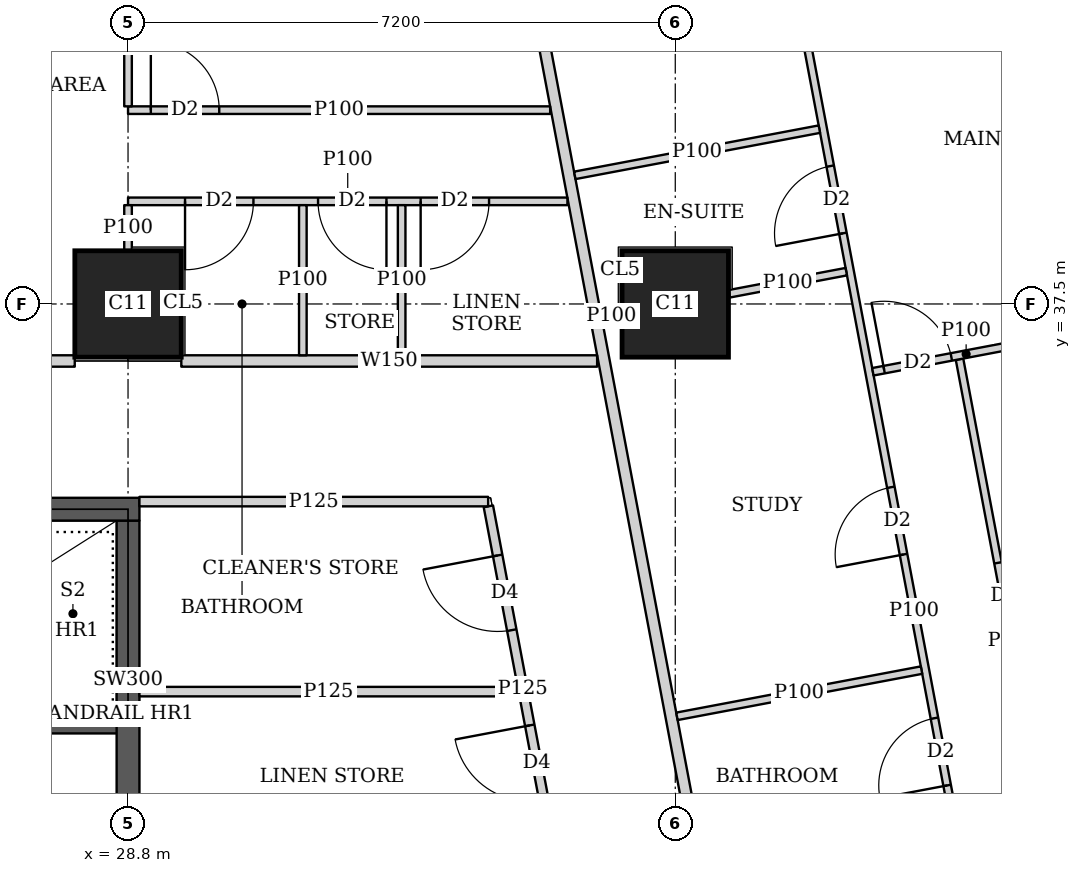
"""IFC4 building model, lengths in metres.
Left out: names, types, materials, properties, quantities, classifications, styles, units other than length and angle.
Written with IfcOpenShell. Run it as: python <this file> out.ifc"""

import sys

from ifc_helpers import new_model, si_unit, direction, frame, frame_2d, origin, origin_2d, place, context, subcontext, project, spatial, rectangle, extrude, element, fill, save


model = new_model("IFC4")
c1 = context("Model", 3, precision=1e-05, world=origin(), true_north=direction((0.0, 1.0)))
c2 = subcontext(c1, "Body", "Model", "MODEL_VIEW")
j1 = project(units=[si_unit("LENGTHUNIT", "METRE"), si_unit("PLANEANGLEUNIT", "RADIAN")], contexts=[c1])
p1 = place(None, origin())
s1 = spatial("IfcSite", under=j1, at=p1, CompositionType="ELEMENT")
p2 = place(p1, origin())
s2 = spatial("IfcBuilding", under=s1, at=p2, CompositionType="ELEMENT")
p3 = place(p2, frame((0.0, 0.0, 285.35)))
s3 = spatial("IfcBuildingStorey", under=s2, at=p3, CompositionType="ELEMENT", Elevation=285.35)
for number, where, z_axis, x_axis in (
    (1, (28.8, 37.5, 0.0), (0.0, 0.0, 1.0), (1.0, 0.0, 0.0)),
    (2, (36.0, 37.5, 0.0), (0.0, 0.0, 1.0), (1.0, 0.0, 0.0)),
):
    element("IfcColumn", number, at=place(p3, frame(where, z_axis=z_axis, x_axis=x_axis)), inside=s3, PredefinedType="COLUMN", context=c2, shape_type="SweptSolid", body=[
        extrude(rectangle(XDim=1.4, YDim=1.4, at=origin_2d()), origin(), (0.0, 0.0, 1.0), 3.75),
    ])
p4 = place(p3, frame((21.45, 34.8, 0.0), z_axis=(0.0, 0.0, 1.0), x_axis=(1.0, 0.0, 0.0)))
e3 = element("IfcWall", 3, at=p4, inside=s3, PredefinedType="SHEAR", context=c2, shape_type="SweptSolid", body=[
    extrude(rectangle(XDim=7.5, YDim=0.3, at=frame_2d((3.75, 0.0))), origin(), (0.0, 0.0, 1.0), 3.75),
])
p5 = place(p4, frame((0.5, 0.0, 0.0)))
e4 = element("IfcOpeningElement", 4, at=p5, cuts=e3, PredefinedType="OPENING", context=c2, shape_type="SweptSolid", body=[
    extrude(rectangle(XDim=1.1, YDim=2.1, at=frame_2d((0.55, 1.05))), frame((0.0, 0.16, 0.0), z_axis=(0.0, -1.0, 0.0), x_axis=(1.0, 0.0, 0.0)), (0.0, 0.0, 1.0), 0.32),
])
p6 = place(p3, frame((28.8, 30.45, 0.0), z_axis=(0.0, 0.0, 1.0), x_axis=(0.0, 1.0, 0.0)))
e5 = element("IfcWall", 5, at=p6, inside=s3, PredefinedType="SHEAR", context=c2, shape_type="SweptSolid", body=[
    extrude(rectangle(XDim=4.2, YDim=0.3, at=frame_2d((2.1, 0.0))), origin(), (0.0, 0.0, 1.0), 3.75),
])
p7 = place(p3, frame((22.301, 36.75, 0.0), z_axis=(0.0, 0.0, 1.0), x_axis=(1.0, 0.0, 0.0)))
e6 = element("IfcWall", 6, at=p7, inside=s3, PredefinedType="SOLIDWALL", context=c2, shape_type="SweptSolid", body=[
    extrude(rectangle(XDim=5.798, YDim=0.15, at=frame_2d((2.899, 0.0))), origin(), (0.0, 0.0, 1.0), 3.5),
])
p8 = place(p7, frame((4.199, 0.0, 0.0)))
e7 = element("IfcOpeningElement", 7, at=p8, cuts=e6, PredefinedType="OPENING", context=c2, shape_type="SweptSolid", body=[
    extrude(rectangle(XDim=1.0, YDim=2.1, at=frame_2d((0.5, 1.05))), frame((0.0, 0.085, 0.0), z_axis=(0.0, -1.0, 0.0), x_axis=(1.0, 0.0, 0.0)), (0.0, 0.0, 1.0), 0.17),
])
p9 = place(p3, frame((29.501, 36.75, 0.0), z_axis=(0.0, 0.0, 1.0), x_axis=(1.0, 0.0, 0.0)))
e8 = element("IfcWall", 8, at=p9, inside=s3, PredefinedType="SOLIDWALL", context=c2, shape_type="SweptSolid", body=[
    extrude(rectangle(XDim=5.471, YDim=0.15, at=frame_2d((2.735, 0.0))), origin(), (0.0, 0.0, 1.0), 3.5),
])
p10 = place(p3, frame((34.036, 42.186, 0.0), z_axis=(0.0, 0.0, 1.0), x_axis=(0.185593518645, -0.9826266055, 0.0)))
e9 = element("IfcWall", 9, at=p10, inside=s3, PredefinedType="SOLIDWALL", context=c2, shape_type="SweptSolid", body=[
    extrude(rectangle(XDim=35.961, YDim=0.15, at=frame_2d((17.98, 0.0))), origin(), (0.0, 0.0, 1.0), 2.5),
])
p11 = place(p10, frame((19.345, 0.0, 0.0)))
e10 = element("IfcOpeningElement", 10, at=p11, cuts=e9, PredefinedType="OPENING", context=c2, shape_type="SweptSolid", body=[
    extrude(rectangle(XDim=1.0, YDim=2.1, at=frame_2d((0.5, 1.05))), frame((0.0, 0.085, 0.0), z_axis=(0.0, -1.0, 0.0), x_axis=(1.0, 0.0, 0.0)), (0.0, 0.0, 1.0), 0.17),
])
p12 = place(p10, frame((33.774, 0.0, 0.0)))
e11 = element("IfcOpeningElement", 11, at=p12, cuts=e9, PredefinedType="OPENING", context=c2, shape_type="SweptSolid", body=[
    extrude(rectangle(XDim=1.0, YDim=2.1, at=frame_2d((0.5, 1.05))), frame((0.0, 0.085, 0.0), z_axis=(0.0, -1.0, 0.0), x_axis=(1.0, 0.0, 0.0)), (0.0, 0.0, 1.0), 0.17),
])
p13 = place(p3, frame((41.054, 37.072, 0.0), z_axis=(0.0, 0.0, 1.0), x_axis=(-0.982579896219, -0.185840650951, 0.0)))
e12 = element("IfcWall", 12, at=p13, inside=s3, PredefinedType="PARTITIONING", context=c2, shape_type="SweptSolid", body=[
    extrude(rectangle(XDim=2.497, YDim=0.1, at=frame_2d((1.249, 0.0))), origin(), (0.0, 0.0, 1.0), 3.5),
])
p14 = place(p13, frame((1.447, 0.0, 0.0)))
e13 = element("IfcOpeningElement", 13, at=p14, cuts=e12, PredefinedType="OPENING", context=c2, shape_type="SweptSolid", body=[
    extrude(rectangle(XDim=0.9, YDim=2.1, at=frame_2d((0.45, 1.05))), frame((0.0, 0.06, 0.0), z_axis=(0.0, -1.0, 0.0), x_axis=(1.0, 0.0, 0.0)), (0.0, 0.0, 1.0), 0.12),
])
p15 = place(p3, frame((37.896, 39.8, 0.0), z_axis=(0.0, 0.0, 1.0), x_axis=(-0.982607026909, -0.185697147715, 0.0)))
e14 = element("IfcWall", 14, at=p15, inside=s3, PredefinedType="PARTITIONING", context=c2, shape_type="SweptSolid", body=[
    extrude(rectangle(XDim=3.275, YDim=0.1, at=frame_2d((1.637, 0.0))), origin(), (0.0, 0.0, 1.0), 3.5),
])
p16 = place(p3, frame((38.25, 37.925, 0.0), z_axis=(0.0, 0.0, 1.0), x_axis=(-0.982610209589, -0.185680305934, 0.0)))
e15 = element("IfcWall", 15, at=p16, inside=s3, PredefinedType="PARTITIONING", context=c2, shape_type="SweptSolid", body=[
    extrude(rectangle(XDim=1.567, YDim=0.1, at=frame_2d((0.784, 0.0))), origin(), (0.0, 0.0, 1.0), 3.5),
])
p17 = place(p3, frame((35.29, 37.366, 0.0), z_axis=(0.0, 0.0, 1.0), x_axis=(-0.982395465615, -0.18681313963, 0.0)))
e16 = element("IfcWall", 16, at=p17, inside=s3, PredefinedType="PARTITIONING", context=c2, shape_type="SweptSolid", body=[
    extrude(rectangle(XDim=0.263, YDim=0.1, at=frame_2d((0.131, 0.0))), origin(), (0.0, 0.0, 1.0), 3.5),
])
p18 = place(p3, frame((39.24, 32.683, 0.0), z_axis=(0.0, 0.0, 1.0), x_axis=(-0.982607026909, -0.185697147715, 0.0)))
e17 = element("IfcWall", 17, at=p18, inside=s3, PredefinedType="PARTITIONING", context=c2, shape_type="SweptSolid", body=[
    extrude(rectangle(XDim=3.275, YDim=0.1, at=frame_2d((1.637, 0.0))), origin(), (0.0, 0.0, 1.0), 3.5),
])
p19 = place(p3, frame((37.591, 41.685, 0.0), z_axis=(0.0, 0.0, 1.0), x_axis=(0.185541820726, -0.982636368532, 0.0)))
e18 = element("IfcWall", 18, at=p19, inside=s3, PredefinedType="PARTITIONING", context=c2, shape_type="SweptSolid", body=[
    extrude(rectangle(XDim=16.735, YDim=0.1, at=frame_2d((8.367, 0.0))), origin(), (0.0, 0.0, 1.0), 2.5),
])
p20 = place(p19, frame((2.413, 0.0, 0.0)))
e19 = element("IfcOpeningElement", 19, at=p20, cuts=e18, PredefinedType="OPENING", context=c2, shape_type="SweptSolid", body=[
    extrude(rectangle(XDim=0.9, YDim=2.1, at=frame_2d((0.45, 1.05))), frame((0.0, 0.06, 0.0), z_axis=(0.0, -1.0, 0.0), x_axis=(1.0, 0.0, 0.0)), (0.0, 0.0, 1.0), 0.12),
])
p21 = place(p19, frame((6.713, 0.0, 0.0)))
e20 = element("IfcOpeningElement", 20, at=p21, cuts=e18, PredefinedType="OPENING", context=c2, shape_type="SweptSolid", body=[
    extrude(rectangle(XDim=0.9, YDim=2.1, at=frame_2d((0.45, 1.05))), frame((0.0, 0.06, 0.0), z_axis=(0.0, -1.0, 0.0), x_axis=(1.0, 0.0, 0.0)), (0.0, 0.0, 1.0), 0.12),
])
p22 = place(p19, frame((9.805, 0.0, 0.0)))
e21 = element("IfcOpeningElement", 21, at=p22, cuts=e18, PredefinedType="OPENING", context=c2, shape_type="SweptSolid", body=[
    extrude(rectangle(XDim=0.9, YDim=2.1, at=frame_2d((0.45, 1.05))), frame((0.0, 0.06, 0.0), z_axis=(0.0, -1.0, 0.0), x_axis=(1.0, 0.0, 0.0)), (0.0, 0.0, 1.0), 0.12),
])
p23 = place(p19, frame((11.713, 0.0, 0.0)))
e22 = element("IfcOpeningElement", 22, at=p23, cuts=e18, PredefinedType="OPENING", context=c2, shape_type="SweptSolid", body=[
    extrude(rectangle(XDim=0.9, YDim=2.1, at=frame_2d((0.45, 1.05))), frame((0.0, 0.06, 0.0), z_axis=(0.0, -1.0, 0.0), x_axis=(1.0, 0.0, 0.0)), (0.0, 0.0, 1.0), 0.12),
])
p24 = place(p19, frame((14.426, 0.0, 0.0)))
e23 = element("IfcOpeningElement", 23, at=p24, cuts=e18, PredefinedType="OPENING", context=c2, shape_type="SweptSolid", body=[
    extrude(rectangle(XDim=0.9, YDim=2.1, at=frame_2d((0.45, 1.05))), frame((0.0, 0.06, 0.0), z_axis=(0.0, -1.0, 0.0), x_axis=(1.0, 0.0, 0.0)), (0.0, 0.0, 1.0), 0.12),
])
p25 = place(p3, frame((39.74, 36.773, 0.0), z_axis=(0.0, 0.0, 1.0), x_axis=(0.185583825641, -0.982628436216, 0.0)))
e24 = element("IfcWall", 24, at=p25, inside=s3, PredefinedType="PARTITIONING", context=c2, shape_type="SweptSolid", body=[
    extrude(rectangle(XDim=7.533, YDim=0.1, at=frame_2d((3.766, 0.0))), origin(), (0.0, 0.0, 1.0), 2.5),
])
p26 = place(p25, frame((2.726, 0.0, 0.0)))
e25 = element("IfcOpeningElement", 25, at=p26, cuts=e24, PredefinedType="OPENING", context=c2, shape_type="SweptSolid", body=[
    extrude(rectangle(XDim=0.9, YDim=2.1, at=frame_2d((0.45, 1.05))), frame((0.0, 0.06, 0.0), z_axis=(0.0, -1.0, 0.0), x_axis=(1.0, 0.0, 0.0)), (0.0, 0.0, 1.0), 0.12),
])
p27 = place(p25, frame((6.383, 0.0, 0.0)))
e26 = element("IfcOpeningElement", 26, at=p27, cuts=e24, PredefinedType="OPENING", context=c2, shape_type="SweptSolid", body=[
    extrude(rectangle(XDim=0.9, YDim=2.1, at=frame_2d((0.45, 1.05))), frame((0.0, 0.06, 0.0), z_axis=(0.0, -1.0, 0.0), x_axis=(1.0, 0.0, 0.0)), (0.0, 0.0, 1.0), 0.12),
])
p28 = place(p3, frame((28.8, 40.1, 0.0), z_axis=(0.0, 0.0, 1.0), x_axis=(0.0, 1.0, 0.0)))
e27 = element("IfcWall", 27, at=p28, inside=s3, PredefinedType="PARTITIONING", context=c2, shape_type="SweptSolid", body=[
    extrude(rectangle(XDim=1.699, YDim=0.1, at=frame_2d((0.85, 0.0))), origin(), (0.0, 0.0, 1.0), 3.5),
])
p29 = place(p3, frame((28.8, 38.201, 0.0), z_axis=(0.0, 0.0, 1.0), x_axis=(0.0, 1.0, 0.0)))
e28 = element("IfcWall", 28, at=p29, inside=s3, PredefinedType="PARTITIONING", context=c2, shape_type="SweptSolid", body=[
    extrude(rectangle(XDim=0.599, YDim=0.1, at=frame_2d((0.3, 0.0))), origin(), (0.0, 0.0, 1.0), 3.5),
])
for number, where, z_axis, x_axis in (
    (29, (32.4, 36.825, 0.0), (0.0, 0.0, 1.0), (0.0, 1.0, 0.0)),
    (30, (31.1, 36.825, 0.0), (0.0, 0.0, 1.0), (0.0, 1.0, 0.0)),
):
    element("IfcWall", number, at=place(p3, frame(where, z_axis=z_axis, x_axis=x_axis)), inside=s3, PredefinedType="PARTITIONING", context=c2, shape_type="SweptSolid", body=[
        extrude(rectangle(XDim=1.975, YDim=0.1, at=frame_2d((0.988, 0.0))), origin(), (0.0, 0.0, 1.0), 3.5),
    ])
p30 = place(p3, frame((28.8, 38.85, 0.0), z_axis=(0.0, 0.0, 1.0), x_axis=(1.0, 0.0, 0.0)))
e31 = element("IfcWall", 31, at=p30, inside=s3, PredefinedType="PARTITIONING", context=c2, shape_type="SweptSolid", body=[
    extrude(rectangle(XDim=5.781, YDim=0.1, at=frame_2d((2.891, 0.0))), origin(), (0.0, 0.0, 1.0), 3.5),
])
p31 = place(p30, frame((0.75, 0.0, 0.0)))
e32 = element("IfcOpeningElement", 32, at=p31, cuts=e31, PredefinedType="OPENING", context=c2, shape_type="SweptSolid", body=[
    extrude(rectangle(XDim=0.9, YDim=2.1, at=frame_2d((0.45, 1.05))), frame((0.0, 0.06, 0.0), z_axis=(0.0, -1.0, 0.0), x_axis=(1.0, 0.0, 0.0)), (0.0, 0.0, 1.0), 0.12),
])
p32 = place(p30, frame((2.5, 0.0, 0.0)))
e33 = element("IfcOpeningElement", 33, at=p32, cuts=e31, PredefinedType="OPENING", context=c2, shape_type="SweptSolid", body=[
    extrude(rectangle(XDim=0.9, YDim=2.1, at=frame_2d((0.45, 1.05))), frame((0.0, 0.06, 0.0), z_axis=(0.0, -1.0, 0.0), x_axis=(1.0, 0.0, 0.0)), (0.0, 0.0, 1.0), 0.12),
])
p33 = place(p30, frame((3.85, 0.0, 0.0)))
e34 = element("IfcOpeningElement", 34, at=p33, cuts=e31, PredefinedType="OPENING", context=c2, shape_type="SweptSolid", body=[
    extrude(rectangle(XDim=0.9, YDim=2.1, at=frame_2d((0.45, 1.05))), frame((0.0, 0.06, 0.0), z_axis=(0.0, -1.0, 0.0), x_axis=(1.0, 0.0, 0.0)), (0.0, 0.0, 1.0), 0.12),
])
p34 = place(p3, frame((28.8, 40.05, 0.0), z_axis=(0.0, 0.0, 1.0), x_axis=(1.0, 0.0, 0.0)))
e35 = element("IfcWall", 35, at=p34, inside=s3, PredefinedType="PARTITIONING", context=c2, shape_type="SweptSolid", body=[
    extrude(rectangle(XDim=5.554, YDim=0.1, at=frame_2d((2.777, 0.0))), origin(), (0.0, 0.0, 1.0), 3.5),
])
p35 = place(p34, frame((0.3, 0.0, 0.0)))
e36 = element("IfcOpeningElement", 36, at=p35, cuts=e35, PredefinedType="OPENING", context=c2, shape_type="SweptSolid", body=[
    extrude(rectangle(XDim=0.9, YDim=2.1, at=frame_2d((0.45, 1.05))), frame((0.0, 0.06, 0.0), z_axis=(0.0, -1.0, 0.0), x_axis=(1.0, 0.0, 0.0)), (0.0, 0.0, 1.0), 0.12),
])
p36 = place(p3, frame((28.95, 34.9, 0.0), z_axis=(0.0, 0.0, 1.0), x_axis=(1.0, 0.0, 0.0)))
e37 = element("IfcWall", 37, at=p36, inside=s3, PredefinedType="PARTITIONING", context=c2, shape_type="SweptSolid", body=[
    extrude(rectangle(XDim=4.588, YDim=0.125, at=frame_2d((2.294, 0.0))), origin(), (0.0, 0.0, 1.0), 3.5),
])
p37 = place(p3, frame((34.448, 30.04, 0.0), z_axis=(0.0, 0.0, 1.0), x_axis=(-0.185749459238, 0.982597139418, 0.0)))
e38 = element("IfcWall", 38, at=p37, inside=s3, PredefinedType="PARTITIONING", context=c2, shape_type="SweptSolid", body=[
    extrude(rectangle(XDim=4.883, YDim=0.125, at=frame_2d((2.441, 0.0))), origin(), (0.0, 0.0, 1.0), 2.5),
])
p38 = place(p37, frame((0.95, 0.0, 0.0)))
e39 = element("IfcOpeningElement", 39, at=p38, cuts=e38, PredefinedType="OPENING", context=c2, shape_type="SweptSolid", body=[
    extrude(rectangle(XDim=1.0, YDim=2.1, at=frame_2d((0.5, 1.05))), frame((0.0, 0.073, 0.0), z_axis=(0.0, -1.0, 0.0), x_axis=(1.0, 0.0, 0.0)), (0.0, 0.0, 1.0), 0.145),
])
p39 = place(p37, frame((3.225, 0.0, 0.0)))
e40 = element("IfcOpeningElement", 40, at=p39, cuts=e38, PredefinedType="OPENING", context=c2, shape_type="SweptSolid", body=[
    extrude(rectangle(XDim=1.0, YDim=2.1, at=frame_2d((0.5, 1.05))), frame((0.0, 0.073, 0.0), z_axis=(0.0, -1.0, 0.0), x_axis=(1.0, 0.0, 0.0)), (0.0, 0.0, 1.0), 0.145),
])
p40 = place(p3, frame((28.95, 32.4, 0.0), z_axis=(0.0, 0.0, 1.0), x_axis=(1.0, 0.0, 0.0)))
e41 = element("IfcWall", 41, at=p40, inside=s3, PredefinedType="PARTITIONING", context=c2, shape_type="SweptSolid", body=[
    extrude(rectangle(XDim=4.976, YDim=0.125, at=frame_2d((2.488, 0.0))), origin(), (0.0, 0.0, 1.0), 3.5),
])
p41 = place(p3, frame((23.0, 31.95, 0.0), z_axis=(0.0, 0.0, 1.0), x_axis=(1.0, 0.0, 0.0)))
e42 = element("IfcWall", 42, at=p41, inside=s3, PredefinedType="SHEAR", context=c2, shape_type="SweptSolid", body=[
    extrude(rectangle(XDim=5.8, YDim=0.2, at=frame_2d((2.9, 0.0))), origin(), (0.0, 0.0, 1.0), 3.75),
])
p42 = place(p14, origin())
e43 = element("IfcDoor", 43, at=p42, inside=s3, OperationType="SINGLE_SWING_LEFT", PredefinedType="DOOR", context=c2, shape_type="SweptSolid", body=[
    extrude(rectangle(XDim=0.9, YDim=2.1, at=frame_2d((0.45, 1.05))), frame((0.0, 0.025, 0.0), z_axis=(0.0, -1.0, 0.0), x_axis=(1.0, 0.0, 0.0)), (0.0, 0.0, 1.0), 0.05),
])
fill(e13, e43)
p43 = place(p20, origin())
e44 = element("IfcDoor", 44, at=p43, inside=s3, OperationType="SINGLE_SWING_LEFT", PredefinedType="DOOR", context=c2, shape_type="SweptSolid", body=[
    extrude(rectangle(XDim=0.9, YDim=2.1, at=frame_2d((0.45, 1.05))), frame((0.0, 0.025, 0.0), z_axis=(0.0, -1.0, 0.0), x_axis=(1.0, 0.0, 0.0)), (0.0, 0.0, 1.0), 0.05),
])
fill(e19, e44)
p44 = place(p21, origin())
e45 = element("IfcDoor", 45, at=p44, inside=s3, OperationType="SINGLE_SWING_LEFT", PredefinedType="DOOR", context=c2, shape_type="SweptSolid", body=[
    extrude(rectangle(XDim=0.9, YDim=2.1, at=frame_2d((0.45, 1.05))), frame((0.0, 0.025, 0.0), z_axis=(0.0, -1.0, 0.0), x_axis=(1.0, 0.0, 0.0)), (0.0, 0.0, 1.0), 0.05),
])
fill(e20, e45)
p45 = place(p22, origin())
e46 = element("IfcDoor", 46, at=p45, inside=s3, OperationType="SINGLE_SWING_LEFT", PredefinedType="DOOR", context=c2, shape_type="SweptSolid", body=[
    extrude(rectangle(XDim=0.9, YDim=2.1, at=frame_2d((0.45, 1.05))), frame((0.0, 0.025, 0.0), z_axis=(0.0, -1.0, 0.0), x_axis=(1.0, 0.0, 0.0)), (0.0, 0.0, 1.0), 0.05),
])
fill(e21, e46)
p46 = place(p26, origin())
e47 = element("IfcDoor", 47, at=p46, inside=s3, OperationType="SINGLE_SWING_RIGHT", PredefinedType="DOOR", context=c2, shape_type="SweptSolid", body=[
    extrude(rectangle(XDim=0.9, YDim=2.1, at=frame_2d((0.45, 1.05))), frame((0.0, 0.025, 0.0), z_axis=(0.0, -1.0, 0.0), x_axis=(1.0, 0.0, 0.0)), (0.0, 0.0, 1.0), 0.05),
])
fill(e25, e47)
p47 = place(p35, origin())
e48 = element("IfcDoor", 48, at=p47, inside=s3, OperationType="SINGLE_SWING_LEFT", PredefinedType="DOOR", context=c2, shape_type="SweptSolid", body=[
    extrude(rectangle(XDim=0.9, YDim=2.1, at=frame_2d((0.45, 1.05))), frame((0.0, 0.025, 0.0), z_axis=(0.0, -1.0, 0.0), x_axis=(1.0, 0.0, 0.0)), (0.0, 0.0, 1.0), 0.05),
])
fill(e36, e48)
p48 = place(p31, origin())
e49 = element("IfcDoor", 49, at=p48, inside=s3, OperationType="SINGLE_SWING_RIGHT", PredefinedType="DOOR", context=c2, shape_type="SweptSolid", body=[
    extrude(rectangle(XDim=0.9, YDim=2.1, at=frame_2d((0.45, 1.05))), frame((0.0, 0.025, 0.0), z_axis=(0.0, -1.0, 0.0), x_axis=(1.0, 0.0, 0.0)), (0.0, 0.0, 1.0), 0.05),
])
fill(e32, e49)
p49 = place(p32, origin())
e50 = element("IfcDoor", 50, at=p49, inside=s3, OperationType="SINGLE_SWING_LEFT", PredefinedType="DOOR", context=c2, shape_type="SweptSolid", body=[
    extrude(rectangle(XDim=0.9, YDim=2.1, at=frame_2d((0.45, 1.05))), frame((0.0, 0.025, 0.0), z_axis=(0.0, -1.0, 0.0), x_axis=(1.0, 0.0, 0.0)), (0.0, 0.0, 1.0), 0.05),
])
fill(e33, e50)
p50 = place(p33, origin())
e51 = element("IfcDoor", 51, at=p50, inside=s3, OperationType="SINGLE_SWING_RIGHT", PredefinedType="DOOR", context=c2, shape_type="SweptSolid", body=[
    extrude(rectangle(XDim=0.9, YDim=2.1, at=frame_2d((0.45, 1.05))), frame((0.0, 0.025, 0.0), z_axis=(0.0, -1.0, 0.0), x_axis=(1.0, 0.0, 0.0)), (0.0, 0.0, 1.0), 0.05),
])
fill(e34, e51)
p51 = place(p38, origin())
e52 = element("IfcDoor", 52, at=p51, inside=s3, OperationType="SINGLE_SWING_RIGHT", PredefinedType="DOOR", context=c2, shape_type="SweptSolid", body=[
    extrude(rectangle(XDim=1.0, YDim=2.1, at=frame_2d((0.5, 1.05))), frame((0.0, 0.025, 0.0), z_axis=(0.0, -1.0, 0.0), x_axis=(1.0, 0.0, 0.0)), (0.0, 0.0, 1.0), 0.05),
])
fill(e39, e52)
p52 = place(p39, origin())
e53 = element("IfcDoor", 53, at=p52, inside=s3, OperationType="SINGLE_SWING_RIGHT", PredefinedType="DOOR", context=c2, shape_type="SweptSolid", body=[
    extrude(rectangle(XDim=1.0, YDim=2.1, at=frame_2d((0.5, 1.05))), frame((0.0, 0.025, 0.0), z_axis=(0.0, -1.0, 0.0), x_axis=(1.0, 0.0, 0.0)), (0.0, 0.0, 1.0), 0.05),
])
fill(e40, e53)
save(model, sys.argv[1])
